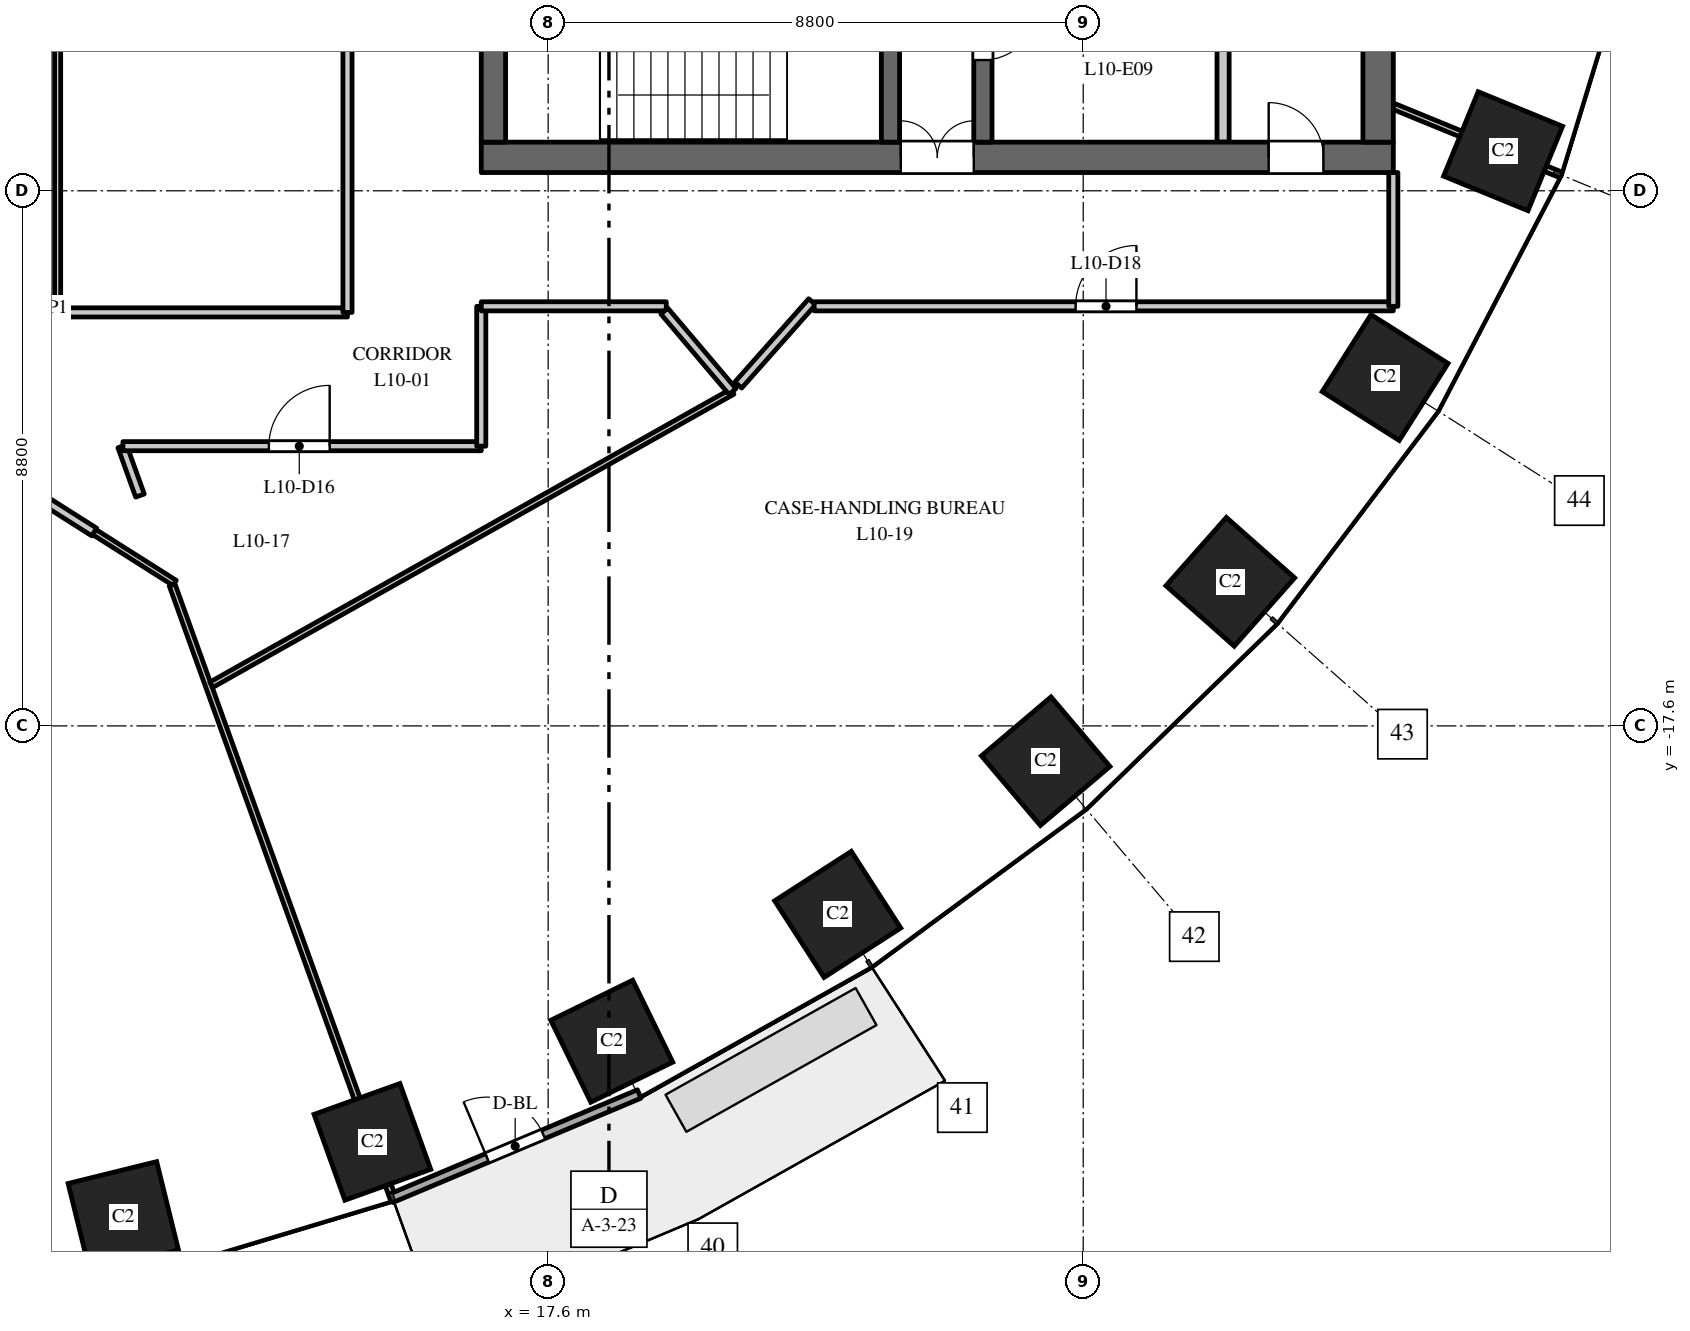
"""IFC4 building model, lengths in metres.
Left out: names, types, materials, properties, quantities, classifications, styles, units other than length and angle.
Written with IfcOpenShell. Run it as: python <this file> out.ifc"""

import sys

from ifc_helpers import new_model, si_unit, direction, frame, frame_2d, origin, origin_2d, place, context, subcontext, project, spatial, rectangle, extrude, element, fill, save


model = new_model("IFC4")
c1 = context("Model", 3, precision=1e-05, world=origin(), true_north=direction((0.0, 1.0)))
c2 = subcontext(c1, "Body", "Model", "MODEL_VIEW")
j1 = project(units=[si_unit("LENGTHUNIT", "METRE"), si_unit("PLANEANGLEUNIT", "RADIAN")], contexts=[c1])
p1 = place(None, origin())
s1 = spatial("IfcSite", under=j1, at=p1, CompositionType="ELEMENT")
p2 = place(p1, origin())
s2 = spatial("IfcBuilding", under=s1, at=p2, CompositionType="ELEMENT")
p3 = place(p2, frame((0.0, 0.0, 50.5)))
s3 = spatial("IfcBuildingStorey", under=s2, at=p3, CompositionType="ELEMENT", Elevation=50.5)
for number, where, z_axis, x_axis in (
    (1, (10.613, -25.674, 0.0), (0.0, 0.0, 1.0), (0.971, 0.24, 0.0)),
    (2, (14.709, -24.441, 0.0), (0.0, 0.0, 1.0), (0.941, 0.338, 0.0)),
    (3, (18.646, -22.785, 0.0), (0.0, 0.0, 1.0), (0.898, 0.439, 0.0)),
    (4, (22.362, -20.7, 0.0), (0.0, 0.0, 1.0), (0.84, 0.542, 0.0)),
    (5, (25.783, -18.18, 0.0), (0.0, 0.0, 1.0), (0.763, 0.646, 0.0)),
    (6, (28.819, -15.23, 0.0), (0.0, 0.0, 1.0), (0.663, 0.749, 0.0)),
    (7, (31.365, -11.871, 0.0), (0.0, 0.0, 1.0), (0.535, 0.845, 0.0)),
    (8, (33.305, -8.149, 0.0), (0.0, 0.0, 1.0), (0.379, 0.925, 0.0)),
):
    element("IfcColumn", number, at=place(p3, frame(where, z_axis=z_axis, x_axis=x_axis)), inside=s3, PredefinedType="COLUMN", context=c2, shape_type="SweptSolid", body=[
        extrude(rectangle(XDim=1.5, YDim=1.5, at=origin_2d()), origin(), (0.0, 0.0, 1.0), 4.0),
    ])
p4 = place(p3, frame((16.5, -8.25, 0.0), z_axis=(0.0, 0.0, 1.0), x_axis=(1.0, 0.0, 0.0)))
e9 = element("IfcWall", 9, at=p4, inside=s3, PredefinedType="SHEAR", context=c2, shape_type="SweptSolid", body=[
    extrude(rectangle(XDim=15.0, YDim=0.5, at=frame_2d((7.5, 0.0))), origin(), (0.0, 0.0, 1.0), 3.7),
])
p5 = place(p4, frame((6.9, 0.0, 0.0)))
e10 = element("IfcOpeningElement", 10, at=p5, cuts=e9, PredefinedType="OPENING", context=c2, shape_type="SweptSolid", body=[
    extrude(rectangle(XDim=1.2, YDim=2.1, at=frame_2d((0.6, 1.05))), frame((0.0, 0.26, 0.0), z_axis=(0.0, -1.0, 0.0), x_axis=(1.0, 0.0, 0.0)), (0.0, 0.0, 1.0), 0.52),
])
p6 = place(p4, frame((12.95, 0.0, 0.0)))
e11 = element("IfcOpeningElement", 11, at=p6, cuts=e9, PredefinedType="OPENING", context=c2, shape_type="SweptSolid", body=[
    extrude(rectangle(XDim=0.9, YDim=2.1, at=frame_2d((0.45, 1.05))), frame((0.0, 0.26, 0.0), z_axis=(0.0, -1.0, 0.0), x_axis=(1.0, 0.0, 0.0)), (0.0, 0.0, 1.0), 0.52),
])
p7 = place(p3, frame((24.75, -8.0, 0.0), z_axis=(0.0, 0.0, 1.0), x_axis=(0.0, 1.0, 0.0)))
e12 = element("IfcWall", 12, at=p7, inside=s3, PredefinedType="SHEAR", context=c2, shape_type="SweptSolid", body=[
    extrude(rectangle(XDim=16.0, YDim=0.3, at=frame_2d((8.0, 0.0))), origin(), (0.0, 0.0, 1.0), 3.7),
])
p8 = place(p7, frame((4.425, 0.0, 0.0)))
e13 = element("IfcOpeningElement", 13, at=p8, cuts=e12, PredefinedType="OPENING", context=c2, shape_type="SweptSolid", body=[
    extrude(rectangle(XDim=1.1, YDim=2.1, at=frame_2d((0.55, 1.05))), frame((0.0, 0.16, 0.0), z_axis=(0.0, -1.0, 0.0), x_axis=(1.0, 0.0, 0.0)), (0.0, 0.0, 1.0), 0.32),
])
p9 = place(p7, frame((7.45, 0.0, 0.0)))
e14 = element("IfcOpeningElement", 14, at=p9, cuts=e12, PredefinedType="OPENING", context=c2, shape_type="SweptSolid", body=[
    extrude(rectangle(XDim=1.1, YDim=2.1, at=frame_2d((0.55, 1.05))), frame((0.0, 0.16, 0.0), z_axis=(0.0, -1.0, 0.0), x_axis=(1.0, 0.0, 0.0)), (0.0, 0.0, 1.0), 0.32),
])
p10 = place(p7, frame((10.425, 0.0, 0.0)))
e15 = element("IfcOpeningElement", 15, at=p10, cuts=e12, PredefinedType="OPENING", context=c2, shape_type="SweptSolid", body=[
    extrude(rectangle(XDim=1.2, YDim=2.1, at=frame_2d((0.6, 1.05))), frame((0.0, 0.16, 0.0), z_axis=(0.0, -1.0, 0.0), x_axis=(1.0, 0.0, 0.0)), (0.0, 0.0, 1.0), 0.32),
])
p11 = place(p7, frame((13.125, 0.0, 0.0)))
e16 = element("IfcOpeningElement", 16, at=p11, cuts=e12, PredefinedType="OPENING", context=c2, shape_type="SweptSolid", body=[
    extrude(rectangle(XDim=0.9, YDim=2.1, at=frame_2d((0.45, 1.05))), frame((0.0, 0.16, 0.0), z_axis=(0.0, -1.0, 0.0), x_axis=(1.0, 0.0, 0.0)), (0.0, 0.0, 1.0), 0.32),
])
p12 = place(p7, frame((14.75, 0.0, 0.0)))
e17 = element("IfcOpeningElement", 17, at=p12, cuts=e12, PredefinedType="OPENING", context=c2, shape_type="SweptSolid", body=[
    extrude(rectangle(XDim=0.9, YDim=2.1, at=frame_2d((0.45, 1.05))), frame((0.0, 0.16, 0.0), z_axis=(0.0, -1.0, 0.0), x_axis=(1.0, 0.0, 0.0)), (0.0, 0.0, 1.0), 0.32),
])
p13 = place(p7, frame((1.35, 0.0, 0.0)))
e18 = element("IfcOpeningElement", 18, at=p13, cuts=e12, PredefinedType="OPENING", context=c2, shape_type="SweptSolid", body=[
    extrude(rectangle(XDim=0.9, YDim=2.1, at=frame_2d((0.45, 1.05))), frame((0.0, 0.16, 0.0), z_axis=(0.0, -1.0, 0.0), x_axis=(1.0, 0.0, 0.0)), (0.0, 0.0, 1.0), 0.32),
])
p14 = place(p3, frame((16.7, -8.0, 0.0), z_axis=(0.0, 0.0, 1.0), x_axis=(0.0, 1.0, 0.0)))
e19 = element("IfcWall", 19, at=p14, inside=s3, PredefinedType="SHEAR", context=c2, shape_type="SweptSolid", body=[
    extrude(rectangle(XDim=16.0, YDim=0.4, at=frame_2d((8.0, 0.0))), origin(), (0.0, 0.0, 1.0), 3.7),
])
p15 = place(p3, frame((31.25, -8.0, 0.0), z_axis=(0.0, 0.0, 1.0), x_axis=(0.0, 1.0, 0.0)))
e20 = element("IfcWall", 20, at=p15, inside=s3, PredefinedType="SHEAR", context=c2, shape_type="SweptSolid", body=[
    extrude(rectangle(XDim=16.0, YDim=0.5, at=frame_2d((8.0, 0.0))), origin(), (0.0, 0.0, 1.0), 3.7),
])
p16 = place(p3, frame((28.7, -8.0, 0.0), z_axis=(0.0, 0.0, 1.0), x_axis=(0.0, 1.0, 0.0)))
e21 = element("IfcWall", 21, at=p16, inside=s3, PredefinedType="PARTITIONING", context=c2, shape_type="SweptSolid", body=[
    extrude(rectangle(XDim=3.25, YDim=0.2, at=frame_2d((1.625, 0.0))), origin(), (0.0, 0.0, 1.0), 3.7),
])
p17 = place(p3, frame((23.23, -8.0, 0.0), z_axis=(0.0, 0.0, 1.0), x_axis=(0.0, 1.0, 0.0)))
e22 = element("IfcWall", 22, at=p17, inside=s3, PredefinedType="SHEAR", context=c2, shape_type="SweptSolid", body=[
    extrude(rectangle(XDim=7.875, YDim=0.3, at=frame_2d((3.938, 0.0))), origin(), (0.0, 0.0, 1.0), 3.7),
])
p18 = place(p17, frame((5.15, 0.0, 0.0)))
e23 = element("IfcOpeningElement", 23, at=p18, cuts=e22, PredefinedType="OPENING", context=c2, shape_type="SweptSolid", body=[
    extrude(rectangle(XDim=1.1, YDim=2.1, at=frame_2d((0.55, 1.05))), frame((0.0, 0.16, 0.0), z_axis=(0.0, -1.0, 0.0), x_axis=(1.0, 0.0, 0.0)), (0.0, 0.0, 1.0), 0.32),
])
p19 = place(p3, frame((15.018, -25.369, 0.0), z_axis=(0.0, 0.0, 1.0), x_axis=(0.921816985161, 0.387625393736, 0.0)))
e24 = element("IfcWall", 24, at=p19, inside=s3, PredefinedType="STANDARD", context=c2, shape_type="SweptSolid", body=[
    extrude(rectangle(XDim=4.426, YDim=0.15, at=frame_2d((2.213, 0.0))), origin(), (0.0, 0.0, 1.0), 3.7),
])
p20 = place(p19, frame((1.713, 0.0, 0.0)))
e25 = element("IfcOpeningElement", 25, at=p20, cuts=e24, PredefinedType="OPENING", context=c2, shape_type="SweptSolid", body=[
    extrude(rectangle(XDim=1.0, YDim=2.4, at=frame_2d((0.5, 1.2))), frame((0.0, 0.085, 0.0), z_axis=(0.0, -1.0, 0.0), x_axis=(1.0, 0.0, 0.0)), (0.0, 0.0, 1.0), 0.17),
])
p21 = place(p3, frame((-14.3, -10.8, 0.0), z_axis=(0.0, 0.0, 1.0), x_axis=(1.0, 0.0, 0.0)))
e26 = element("IfcWall", 26, at=p21, inside=s3, PredefinedType="PARTITIONING", context=c2, shape_type="SweptSolid", body=[
    extrude(rectangle(XDim=28.6, YDim=0.15, at=frame_2d((14.3, 0.0))), origin(), (0.0, 0.0, 1.0), 2.85),
])
p22 = place(p21, frame((11.4, 0.0, 0.0)))
e27 = element("IfcOpeningElement", 27, at=p22, cuts=e26, PredefinedType="OPENING", context=c2, shape_type="SweptSolid", body=[
    extrude(rectangle(XDim=1.0, YDim=2.1, at=frame_2d((0.5, 1.05))), frame((0.0, 0.085, 0.0), z_axis=(0.0, -1.0, 0.0), x_axis=(1.0, 0.0, 0.0)), (0.0, 0.0, 1.0), 0.17),
])
p23 = place(p21, frame((16.167, 0.0, 0.0)))
e28 = element("IfcOpeningElement", 28, at=p23, cuts=e26, PredefinedType="OPENING", context=c2, shape_type="SweptSolid", body=[
    extrude(rectangle(XDim=1.0, YDim=2.1, at=frame_2d((0.5, 1.05))), frame((0.0, 0.085, 0.0), z_axis=(0.0, -1.0, 0.0), x_axis=(1.0, 0.0, 0.0)), (0.0, 0.0, 1.0), 0.17),
])
p24 = place(p3, frame((8.028, -13.077, 0.0), z_axis=(0.0, 0.0, 1.0), x_axis=(0.844718865656, -0.53521027457, 0.0)))
e29 = element("IfcWall", 29, at=p24, inside=s3, PredefinedType="PARTITIONING", context=c2, shape_type="SweptSolid", body=[
    extrude(rectangle(XDim=2.497, YDim=0.15, at=frame_2d((1.248, 0.0))), origin(), (0.0, 0.0, 1.0), 3.7),
])
p25 = place(p3, frame((9.533, -10.725, 0.0), z_axis=(0.0, 0.0, 1.0), x_axis=(0.0, 1.0, 0.0)))
e30 = element("IfcWall", 30, at=p25, inside=s3, PredefinedType="PARTITIONING", context=c2, shape_type="SweptSolid", body=[
    extrude(rectangle(XDim=21.45, YDim=0.1, at=frame_2d((10.725, 0.0))), origin(), (0.0, 0.0, 1.0), 2.75),
])
p26 = place(p3, frame((10.137, -14.413, 0.0), z_axis=(0.0, 0.0, 1.0), x_axis=(0.844849680057, -0.535003755228, 0.0)))
e31 = element("IfcWall", 31, at=p26, inside=s3, PredefinedType="PARTITIONING", context=c2, shape_type="SweptSolid", body=[
    extrude(rectangle(XDim=1.562, YDim=0.1, at=frame_2d((0.781, 0.0))), origin(), (0.0, 0.0, 1.0), 3.7),
])
p27 = place(p3, frame((10.595, -13.0, 0.0), z_axis=(0.0, 0.0, 1.0), x_axis=(0.338378813476, -0.941009977944, 0.0)))
e32 = element("IfcWall", 32, at=p27, inside=s3, PredefinedType="PARTITIONING", context=c2, shape_type="SweptSolid", body=[
    extrude(rectangle(XDim=0.863, YDim=0.15, at=frame_2d((0.432, 0.0))), origin(), (0.0, 0.0, 1.0), 3.7),
])
p28 = place(p3, frame((10.607, -13.0, 0.0), z_axis=(0.0, 0.0, 1.0), x_axis=(1.0, 0.0, 0.0)))
e33 = element("IfcWall", 33, at=p28, inside=s3, PredefinedType="PARTITIONING", context=c2, shape_type="SweptSolid", body=[
    extrude(rectangle(XDim=5.893, YDim=0.15, at=frame_2d((2.947, 0.0))), origin(), (0.0, 0.0, 1.0), 3.7),
])
p29 = place(p28, frame((2.4, 0.0, 0.0)))
e34 = element("IfcOpeningElement", 34, at=p29, cuts=e33, PredefinedType="OPENING", context=c2, shape_type="SweptSolid", body=[
    extrude(rectangle(XDim=1.0, YDim=2.1, at=frame_2d((0.5, 1.05))), frame((0.0, 0.085, 0.0), z_axis=(0.0, -1.0, 0.0), x_axis=(1.0, 0.0, 0.0)), (0.0, 0.0, 1.0), 0.17),
])
p30 = place(p3, frame((11.416, -15.282, 0.0), z_axis=(0.0, 0.0, 1.0), x_axis=(0.338824973611, -0.940849423265, 0.0)))
e35 = element("IfcWall", 35, at=p30, inside=s3, PredefinedType="PARTITIONING", context=c2, shape_type="SweptSolid", body=[
    extrude(rectangle(XDim=10.734, YDim=0.1, at=frame_2d((5.367, 0.0))), origin(), (0.0, 0.0, 1.0), 3.7),
])
p31 = place(p3, frame((12.06, -16.924, 0.0), z_axis=(0.0, 0.0, 1.0), x_axis=(0.871521837039, 0.490356694218, 0.0)))
e36 = element("IfcWall", 36, at=p31, inside=s3, PredefinedType="PARTITIONING", context=c2, shape_type="SweptSolid", body=[
    extrude(rectangle(XDim=9.836, YDim=0.1, at=frame_2d((4.918, 0.0))), origin(), (0.0, 0.0, 1.0), 3.7),
])
p32 = place(p3, frame((14.3, -10.8, 0.0), z_axis=(0.0, 0.0, 1.0), x_axis=(0.0, 1.0, 0.0)))
e37 = element("IfcWall", 37, at=p32, inside=s3, PredefinedType="PARTITIONING", context=c2, shape_type="SweptSolid", body=[
    extrude(rectangle(XDim=21.6, YDim=0.15, at=frame_2d((10.8, 0.0))), origin(), (0.0, 0.0, 1.0), 2.75),
])
p33 = place(p32, frame((10.2, 0.0, 0.0)))
e38 = element("IfcOpeningElement", 38, at=p33, cuts=e37, PredefinedType="OPENING", context=c2, shape_type="SweptSolid", body=[
    extrude(rectangle(XDim=1.0, YDim=2.1, at=frame_2d((0.5, 1.05))), frame((0.0, 0.085, 0.0), z_axis=(0.0, -1.0, 0.0), x_axis=(1.0, 0.0, 0.0)), (0.0, 0.0, 1.0), 0.17),
])
p34 = place(p3, frame((16.5, -13.0, 0.0), z_axis=(0.0, 0.0, 1.0), x_axis=(0.0, 1.0, 0.0)))
e39 = element("IfcWall", 39, at=p34, inside=s3, PredefinedType="PARTITIONING", context=c2, shape_type="SweptSolid", body=[
    extrude(rectangle(XDim=2.3, YDim=0.15, at=frame_2d((1.15, 0.0))), origin(), (0.0, 0.0, 1.0), 3.7),
])
p35 = place(p3, frame((16.5, -10.7, 0.0), z_axis=(0.0, 0.0, 1.0), x_axis=(1.0, 0.0, 0.0)))
e40 = element("IfcWall", 40, at=p35, inside=s3, PredefinedType="PARTITIONING", context=c2, shape_type="SweptSolid", body=[
    extrude(rectangle(XDim=3.043, YDim=0.15, at=frame_2d((1.521, 0.0))), origin(), (0.0, 0.0, 1.0), 3.7),
])
p36 = place(p3, frame((19.511, -10.778, 0.0), z_axis=(0.0, 0.0, 1.0), x_axis=(0.646491141339, -0.762921492796, 0.0)))
e41 = element("IfcWall", 41, at=p36, inside=s3, PredefinedType="PARTITIONING", context=c2, shape_type="SweptSolid", body=[
    extrude(rectangle(XDim=1.734, YDim=0.15, at=frame_2d((0.867, 0.0))), origin(), (0.0, 0.0, 1.0), 3.7),
])
p37 = place(p3, frame((20.727, -11.994, 0.0), z_axis=(0.0, 0.0, 1.0), x_axis=(0.663767495264, 0.747938976275, 0.0)))
e42 = element("IfcWall", 42, at=p37, inside=s3, PredefinedType="PARTITIONING", context=c2, shape_type="SweptSolid", body=[
    extrude(rectangle(XDim=1.83, YDim=0.15, at=frame_2d((0.915, 0.0))), origin(), (0.0, 0.0, 1.0), 2.75),
])
p38 = place(p3, frame((21.975, -10.7, 0.0), z_axis=(0.0, 0.0, 1.0), x_axis=(1.0, 0.0, 0.0)))
e43 = element("IfcWall", 43, at=p38, inside=s3, PredefinedType="PARTITIONING", context=c2, shape_type="SweptSolid", body=[
    extrude(rectangle(XDim=9.525, YDim=0.15, at=frame_2d((4.762, 0.0))), origin(), (0.0, 0.0, 1.0), 2.85),
])
p39 = place(p38, frame((4.3, 0.0, 0.0)))
e44 = element("IfcOpeningElement", 44, at=p39, cuts=e43, PredefinedType="OPENING", context=c2, shape_type="SweptSolid", body=[
    extrude(rectangle(XDim=1.0, YDim=2.1, at=frame_2d((0.5, 1.05))), frame((0.0, 0.085, 0.0), z_axis=(0.0, -1.0, 0.0), x_axis=(1.0, 0.0, 0.0)), (0.0, 0.0, 1.0), 0.17),
])
p40 = place(p3, frame((31.5, -10.7, 0.0), z_axis=(0.0, 0.0, 1.0), x_axis=(0.0, 1.0, 0.0)))
e45 = element("IfcWall", 45, at=p40, inside=s3, PredefinedType="PARTITIONING", context=c2, shape_type="SweptSolid", body=[
    extrude(rectangle(XDim=2.2, YDim=0.15, at=frame_2d((1.1, 0.0))), origin(), (0.0, 0.0, 1.0), 2.85),
])
p41 = place(p3, frame((31.5, -7.41, 0.0), z_axis=(0.0, 0.0, 1.0), x_axis=(0.925344112436, -0.379128307542, 0.0)))
e46 = element("IfcWall", 46, at=p41, inside=s3, PredefinedType="PARTITIONING", context=c2, shape_type="SweptSolid", body=[
    extrude(rectangle(XDim=2.954, YDim=0.1, at=frame_2d((1.477, 0.0))), origin(), (0.0, 0.0, 1.0), 3.7),
])
p42 = place(p5, origin())
e47 = element("IfcDoor", 47, at=p42, inside=s3, OperationType="DOUBLE_DOOR_DOUBLE_SWING", PredefinedType="DOOR", context=c2, shape_type="SweptSolid", body=[
    extrude(rectangle(XDim=1.2, YDim=2.1, at=frame_2d((0.6, 1.05))), frame((0.0, 0.025, 0.0), z_axis=(0.0, -1.0, 0.0), x_axis=(1.0, 0.0, 0.0)), (0.0, 0.0, 1.0), 0.05),
])
fill(e10, e47)
p43 = place(p13, origin())
e48 = element("IfcDoor", 48, at=p43, inside=s3, OperationType="SINGLE_SWING_RIGHT", PredefinedType="DOOR", context=c2, shape_type="SweptSolid", body=[
    extrude(rectangle(XDim=0.9, YDim=2.1, at=frame_2d((0.45, 1.05))), frame((0.0, 0.025, 0.0), z_axis=(0.0, -1.0, 0.0), x_axis=(1.0, 0.0, 0.0)), (0.0, 0.0, 1.0), 0.05),
])
fill(e18, e48)
p44 = place(p6, origin())
e49 = element("IfcDoor", 49, at=p44, inside=s3, OperationType="SINGLE_SWING_RIGHT", PredefinedType="DOOR", context=c2, shape_type="SweptSolid", body=[
    extrude(rectangle(XDim=0.9, YDim=2.1, at=frame_2d((0.45, 1.05))), frame((0.0, 0.025, 0.0), z_axis=(0.0, -1.0, 0.0), x_axis=(1.0, 0.0, 0.0)), (0.0, 0.0, 1.0), 0.05),
])
fill(e11, e49)
p45 = place(p20, origin())
e50 = element("IfcDoor", 50, at=p45, inside=s3, OperationType="SINGLE_SWING_LEFT", PredefinedType="DOOR", context=c2, shape_type="SweptSolid", body=[
    extrude(rectangle(XDim=1.0, YDim=2.4, at=frame_2d((0.5, 1.2))), frame((0.0, 0.025, 0.0), z_axis=(0.0, -1.0, 0.0), x_axis=(1.0, 0.0, 0.0)), (0.0, 0.0, 1.0), 0.05),
])
fill(e25, e50)
p46 = place(p29, origin())
e51 = element("IfcDoor", 51, at=p46, inside=s3, OperationType="SINGLE_SWING_RIGHT", PredefinedType="DOOR", context=c2, shape_type="SweptSolid", body=[
    extrude(rectangle(XDim=1.0, YDim=2.1, at=frame_2d((0.5, 1.05))), frame((0.0, 0.025, 0.0), z_axis=(0.0, -1.0, 0.0), x_axis=(1.0, 0.0, 0.0)), (0.0, 0.0, 1.0), 0.05),
])
fill(e34, e51)
p47 = place(p39, origin())
e52 = element("IfcDoor", 52, at=p47, inside=s3, OperationType="SINGLE_SWING_RIGHT", PredefinedType="DOOR", context=c2, shape_type="SweptSolid", body=[
    extrude(rectangle(XDim=1.0, YDim=2.1, at=frame_2d((0.5, 1.05))), frame((0.0, 0.025, 0.0), z_axis=(0.0, -1.0, 0.0), x_axis=(1.0, 0.0, 0.0)), (0.0, 0.0, 1.0), 0.05),
])
fill(e44, e52)
save(model, sys.argv[1])
